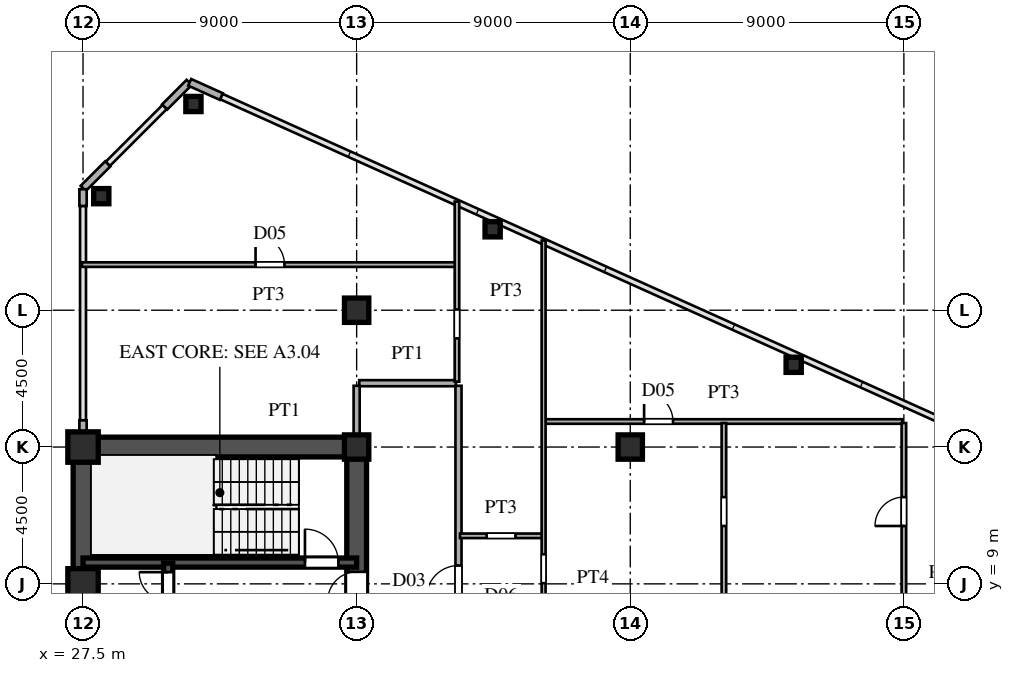
"""IFC4 building model, lengths in metres.
Left out: names, types, materials, properties, quantities, classifications, styles, units other than length and angle.
Written with IfcOpenShell. Run it as: python <this file> out.ifc"""

import sys

from ifc_helpers import new_model, si_unit, direction, frame, frame_2d, origin, origin_2d, place, context, subcontext, project, spatial, rectangle, hollow_rectangle, i_section, extrude, source, transform, mapped, element, fill, save


model = new_model("IFC4")
c1 = context("Model", 3, precision=1e-05, world=origin(), true_north=direction((0.0, 1.0)))
c2 = subcontext(c1, "Body", "Model", "MODEL_VIEW")
j1 = project(units=[si_unit("LENGTHUNIT", "METRE"), si_unit("PLANEANGLEUNIT", "RADIAN")], contexts=[c1])
p1 = place(None, origin())
s1 = spatial("IfcSite", under=j1, at=p1, CompositionType="ELEMENT")
p2 = place(p1, origin())
s2 = spatial("IfcBuilding", under=s1, at=p2, CompositionType="ELEMENT")
p3 = place(p2, frame((0.0, 0.0, 99.6)))
s3 = spatial("IfcBuildingStorey", under=s2, at=p3, CompositionType="ELEMENT", Elevation=99.6)
m1 = source(origin(), c2, "Body", "SweptSolid", [
    extrude(hollow_rectangle(XDim=1.0, YDim=1.0, WallThickness=0.042, at=origin_2d()), origin(), (0.0, 0.0, 1.0), 3.6),
])
for number, where, z_axis, x_axis in (
    (1, (27.5, 9.0, 0.0), (0.0, 0.0, 1.0), (1.0, 0.0, 0.0)),
    (2, (27.5, 13.5, 0.0), (0.0, 0.0, 1.0), (1.0, 0.0, 0.0)),
):
    element("IfcColumn", number, at=place(p3, frame(where, z_axis=z_axis, x_axis=x_axis)), inside=s3, PredefinedType="COLUMN", context=c2, shape_type="MappedRepresentation", body=[
        mapped(m1, transform((0.0, 0.0, 0.0), scale=1.0)),
    ])
m2 = source(origin(), c2, "Body", "SweptSolid", [
    extrude(i_section(OverallWidth=0.8, OverallDepth=0.8, WebThickness=0.032, FlangeThickness=0.05, at=origin_2d()), origin(), (0.0, 0.0, 1.0), 3.6),
])
for number, where, z_axis, x_axis in (
    (3, (36.5, 13.5, 0.0), (0.0, 0.0, 1.0), (1.0, 0.0, 0.0)),
    (4, (36.5, 18.0, 0.0), (0.0, 0.0, 1.0), (1.0, 0.0, 0.0)),
    (5, (45.5, 13.5, 0.0), (0.0, 0.0, 1.0), (1.0, 0.0, 0.0)),
):
    element("IfcColumn", number, at=place(p3, frame(where, z_axis=z_axis, x_axis=x_axis)), inside=s3, PredefinedType="COLUMN", context=c2, shape_type="MappedRepresentation", body=[
        mapped(m2, transform((0.0, 0.0, 0.0), scale=1.0)),
    ])
m3 = source(origin(), c2, "Body", "SweptSolid", [
    extrude(hollow_rectangle(XDim=0.5, YDim=0.5, WallThickness=0.02, at=origin_2d()), origin(), (0.0, 0.0, 1.0), 3.6),
])
for number, where, z_axis, x_axis in (
    (6, (31.131, 24.783, 0.0), (0.0, 0.0, 1.0), (1.0, 0.0, 0.0)),
    (7, (28.1, 21.751, 0.0), (0.0, 0.0, 1.0), (1.0, 0.0, 0.0)),
    (8, (40.973, 20.661, 0.0), (0.0, 0.0, 1.0), (1.0, 0.0, 0.0)),
    (9, (50.875, 16.205, 0.0), (0.0, 0.0, 1.0), (1.0, 0.0, 0.0)),
):
    element("IfcColumn", number, at=place(p3, frame(where, z_axis=z_axis, x_axis=x_axis)), inside=s3, PredefinedType="COLUMN", context=c2, shape_type="MappedRepresentation", body=[
        mapped(m3, transform((0.0, 0.0, 0.0), scale=1.0)),
    ])
p4 = place(p3, frame((32.049, 25.028, 0.0), z_axis=(0.0, 0.0, 1.0), x_axis=(-0.911929519623, 0.410346866979, 0.0)))
e10 = element("IfcWall", 10, at=p4, inside=s3, PredefinedType="SOLIDWALL", context=c2, shape_type="SweptSolid", body=[
    extrude(rectangle(XDim=1.14, YDim=0.24, at=frame_2d((0.57, 0.0))), origin(), (0.0, 0.0, 1.0), 3.38),
])
for number, where, z_axis, x_axis in (
    (11, (30.993, 25.493, 0.0), (0.0, 0.0, 1.0), (-0.707, -0.707, 0.0)),
    (12, (28.313, 22.813, 0.0), (0.0, 0.0, 1.0), (-0.707, -0.707, 0.0)),
):
    element("IfcWall", number, at=place(p3, frame(where, z_axis=z_axis, x_axis=x_axis)), inside=s3, PredefinedType="SOLIDWALL", context=c2, shape_type="SweptSolid", body=[
        extrude(rectangle(XDim=1.14, YDim=0.24, at=frame_2d((0.57, 0.0))), origin(), (0.0, 0.0, 1.0), 3.38),
    ])
p5 = place(p3, frame((27.5, 13.83, 0.0), z_axis=(0.0, 0.0, 1.0), x_axis=(0.0, 1.0, 0.0)))
e13 = element("IfcWall", 13, at=p5, inside=s3, PredefinedType="SOLIDWALL", context=c2, shape_type="SweptSolid", body=[
    extrude(rectangle(XDim=0.55, YDim=0.24, at=frame_2d((0.275, 0.0))), origin(), (0.0, 0.0, 1.0), 2.88),
])
p6 = place(p3, frame((27.5, 21.43, 0.0), z_axis=(0.0, 0.0, 1.0), x_axis=(0.0, 1.0, 0.0)))
e14 = element("IfcWall", 14, at=p6, inside=s3, PredefinedType="SOLIDWALL", context=c2, shape_type="SweptSolid", body=[
    extrude(rectangle(XDim=0.55, YDim=0.24, at=frame_2d((0.275, 0.0))), origin(), (0.0, 0.0, 1.0), 3.38),
])
p7 = place(p3, frame((27.5, 1.3, 0.0), z_axis=(0.0, 0.0, 1.0), x_axis=(0.0, 1.0, 0.0)))
e15 = element("IfcWall", 15, at=p7, inside=s3, PredefinedType="SHEAR", context=c2, shape_type="SweptSolid", body=[
    extrude(rectangle(XDim=12.2, YDim=0.65, at=frame_2d((6.1, 0.0))), origin(), (0.0, 0.0, 1.0), 3.38),
])
p8 = place(p3, frame((27.5, 13.5, 0.0), z_axis=(0.0, 0.0, 1.0), x_axis=(1.0, 0.0, 0.0)))
e16 = element("IfcWall", 16, at=p8, inside=s3, PredefinedType="SHEAR", context=c2, shape_type="SweptSolid", body=[
    extrude(rectangle(XDim=9.0, YDim=0.65, at=frame_2d((4.5, 0.0))), origin(), (0.0, 0.0, 1.0), 3.38),
])
p9 = place(p3, frame((36.5, 8.2, 0.0), z_axis=(0.0, 0.0, 1.0), x_axis=(0.0, 1.0, 0.0)))
e17 = element("IfcWall", 17, at=p9, inside=s3, PredefinedType="SHEAR", context=c2, shape_type="SweptSolid", body=[
    extrude(rectangle(XDim=5.45, YDim=0.65, at=frame_2d((2.725, 0.0))), origin(), (0.0, 0.0, 1.0), 3.38),
])
p10 = place(p9, frame((0.245, 0.0, 0.0)))
e18 = element("IfcOpeningElement", 18, at=p10, cuts=e17, PredefinedType="OPENING", context=c2, shape_type="SweptSolid", body=[
    extrude(rectangle(XDim=0.95, YDim=2.15, at=frame_2d((0.475, 1.075))), frame((0.0, 0.335, 0.0), z_axis=(0.0, -1.0, 0.0), x_axis=(1.0, 0.0, 0.0)), (0.0, 0.0, 1.0), 0.67),
])
p11 = place(p3, frame((27.5, 9.7, 0.0), z_axis=(0.0, 0.0, 1.0), x_axis=(1.0, 0.0, 0.0)))
e19 = element("IfcWall", 19, at=p11, inside=s3, PredefinedType="SHEAR", context=c2, shape_type="SweptSolid", body=[
    extrude(rectangle(XDim=9.0, YDim=0.3, at=frame_2d((4.5, 0.0))), origin(), (0.0, 0.0, 1.0), 3.38),
])
p12 = place(p11, frame((7.3, 0.0, 0.0)))
e20 = element("IfcOpeningElement", 20, at=p12, cuts=e19, PredefinedType="OPENING", context=c2, shape_type="SweptSolid", body=[
    extrude(rectangle(XDim=1.1, YDim=2.2, at=frame_2d((0.55, 1.1))), frame((0.0, 0.16, 0.0), z_axis=(0.0, -1.0, 0.0), x_axis=(1.0, 0.0, 0.0)), (0.0, 0.0, 1.0), 0.32),
])
p13 = place(p3, frame((30.3, 8.15, 0.0), z_axis=(0.0, 0.0, 1.0), x_axis=(0.0, 1.0, 0.0)))
e21 = element("IfcWall", 21, at=p13, inside=s3, PredefinedType="SHEAR", context=c2, shape_type="SweptSolid", body=[
    extrude(rectangle(XDim=1.53, YDim=0.3, at=frame_2d((0.765, 0.0))), origin(), (0.0, 0.0, 1.0), 3.38),
])
p14 = place(p13, frame((0.285, 0.0, 0.0)))
e22 = element("IfcOpeningElement", 22, at=p14, cuts=e21, PredefinedType="OPENING", context=c2, shape_type="SweptSolid", body=[
    extrude(rectangle(XDim=0.95, YDim=2.15, at=frame_2d((0.475, 1.075))), frame((0.0, 0.16, 0.0), z_axis=(0.0, -1.0, 0.0), x_axis=(1.0, 0.0, 0.0)), (0.0, 0.0, 1.0), 0.32),
])
p15 = place(p3, frame((39.9, 10.58, 0.0), z_axis=(0.0, 0.0, 1.0), x_axis=(1.0, 0.0, 0.0)))
e23 = element("IfcWall", 23, at=p15, inside=s3, PredefinedType="PARTITIONING", context=c2, shape_type="SweptSolid", body=[
    extrude(rectangle(XDim=2.7, YDim=0.15, at=frame_2d((1.35, 0.0))), origin(), (0.0, 0.0, 1.0), 3.38),
])
p16 = place(p15, frame((0.875, 0.0, 0.0)))
e24 = element("IfcOpeningElement", 24, at=p16, cuts=e23, PredefinedType="OPENING", context=c2, shape_type="SweptSolid", body=[
    extrude(rectangle(XDim=0.95, YDim=2.15, at=frame_2d((0.475, 1.075))), frame((0.0, 0.085, 0.0), z_axis=(0.0, -1.0, 0.0), x_axis=(1.0, 0.0, 0.0)), (0.0, 0.0, 1.0), 0.17),
])
p17 = place(p3, frame((42.7, 14.34, 0.0), z_axis=(0.0, 0.0, 1.0), x_axis=(1.0, 0.0, 0.0)))
e25 = element("IfcWall", 25, at=p17, inside=s3, PredefinedType="PARTITIONING", context=c2, shape_type="SweptSolid", body=[
    extrude(rectangle(XDim=11.75, YDim=0.15, at=frame_2d((5.875, 0.0))), origin(), (0.0, 0.0, 1.0), 3.38),
])
p18 = place(p17, frame((3.255, 0.0, 0.0)))
e26 = element("IfcOpeningElement", 26, at=p18, cuts=e25, PredefinedType="OPENING", context=c2, shape_type="SweptSolid", body=[
    extrude(rectangle(XDim=0.95, YDim=2.15, at=frame_2d((0.475, 1.075))), frame((0.0, 0.085, 0.0), z_axis=(0.0, -1.0, 0.0), x_axis=(1.0, 0.0, 0.0)), (0.0, 0.0, 1.0), 0.17),
])
p19 = place(p3, frame((36.585, 15.6, 0.0), z_axis=(0.0, 0.0, 1.0), x_axis=(1.0, 0.0, 0.0)))
e27 = element("IfcWall", 27, at=p19, inside=s3, PredefinedType="PARTITIONING", context=c2, shape_type="SweptSolid", body=[
    extrude(rectangle(XDim=3.18, YDim=0.2, at=frame_2d((1.59, 0.0))), origin(), (0.0, 0.0, 1.0), 3.38),
])
p20 = place(p3, frame((27.465, 19.5, 0.0), z_axis=(0.0, 0.0, 1.0), x_axis=(1.0, 0.0, 0.0)))
e28 = element("IfcWall", 28, at=p20, inside=s3, PredefinedType="PARTITIONING", context=c2, shape_type="SweptSolid", body=[
    extrude(rectangle(XDim=12.285, YDim=0.15, at=frame_2d((6.143, 0.0))), origin(), (0.0, 0.0, 1.0), 3.38),
])
p21 = place(p20, frame((5.71, 0.0, 0.0)))
e29 = element("IfcOpeningElement", 29, at=p21, cuts=e28, PredefinedType="OPENING", context=c2, shape_type="SweptSolid", body=[
    extrude(rectangle(XDim=0.95, YDim=2.15, at=frame_2d((0.475, 1.075))), frame((0.0, 0.085, 0.0), z_axis=(0.0, -1.0, 0.0), x_axis=(1.0, 0.0, 0.0)), (0.0, 0.0, 1.0), 0.17),
])
p22 = place(p3, frame((36.5, 13.83, 0.0), z_axis=(0.0, 0.0, 1.0), x_axis=(0.0, 1.0, 0.0)))
e30 = element("IfcWall", 30, at=p22, inside=s3, PredefinedType="PARTITIONING", context=c2, shape_type="SweptSolid", body=[
    extrude(rectangle(XDim=1.685, YDim=0.2, at=frame_2d((0.842, 0.0))), origin(), (0.0, 0.0, 1.0), 2.68),
])
p23 = place(p3, frame((39.8, 15.65, 0.0), z_axis=(0.0, 0.0, 1.0), x_axis=(0.0, 1.0, 0.0)))
e31 = element("IfcWall", 31, at=p23, inside=s3, PredefinedType="PARTITIONING", context=c2, shape_type="SweptSolid", body=[
    extrude(rectangle(XDim=5.925, YDim=0.15, at=frame_2d((2.962, 0.0))), origin(), (0.0, 0.0, 1.0), 3.38),
])
p24 = place(p23, frame((1.425, 0.0, 0.0)))
e32 = element("IfcOpeningElement", 32, at=p24, cuts=e31, PredefinedType="OPENING", context=c2, shape_type="SweptSolid", body=[
    extrude(rectangle(XDim=0.95, YDim=2.15, at=frame_2d((0.475, 1.075))), frame((0.0, 0.085, 0.0), z_axis=(0.0, -1.0, 0.0), x_axis=(1.0, 0.0, 0.0)), (0.0, 0.0, 1.0), 0.17),
])
p25 = place(p3, frame((39.85, -15.515, 0.0), z_axis=(0.0, 0.0, 1.0), x_axis=(0.0, 1.0, 0.0)))
e33 = element("IfcWall", 33, at=p25, inside=s3, PredefinedType="PARTITIONING", context=c2, shape_type="SweptSolid", body=[
    extrude(rectangle(XDim=31.03, YDim=0.2, at=frame_2d((15.515, 0.0))), origin(), (0.0, 0.0, 1.0), 3.38),
])
p26 = place(p25, frame((0.94, 0.0, 0.0)))
e34 = element("IfcOpeningElement", 34, at=p26, cuts=e33, PredefinedType="OPENING", context=c2, shape_type="SweptSolid", body=[
    extrude(rectangle(XDim=1.05, YDim=2.25, at=frame_2d((0.525, 1.125))), frame((0.0, 0.11, 0.0), z_axis=(0.0, -1.0, 0.0), x_axis=(1.0, 0.0, 0.0)), (0.0, 0.0, 1.0), 0.22),
])
p27 = place(p25, frame((9.765, 0.0, 0.0)))
e35 = element("IfcOpeningElement", 35, at=p27, cuts=e33, PredefinedType="OPENING", context=c2, shape_type="SweptSolid", body=[
    extrude(rectangle(XDim=1.05, YDim=2.25, at=frame_2d((0.525, 1.125))), frame((0.0, 0.11, 0.0), z_axis=(0.0, -1.0, 0.0), x_axis=(1.0, 0.0, 0.0)), (0.0, 0.0, 1.0), 0.22),
])
p28 = place(p25, frame((24.067, 0.0, 0.0)))
e36 = element("IfcOpeningElement", 36, at=p28, cuts=e33, PredefinedType="OPENING", context=c2, shape_type="SweptSolid", body=[
    extrude(rectangle(XDim=1.05, YDim=2.25, at=frame_2d((0.525, 1.125))), frame((0.0, 0.11, 0.0), z_axis=(0.0, -1.0, 0.0), x_axis=(1.0, 0.0, 0.0)), (0.0, 0.0, 1.0), 0.22),
])
p29 = place(p3, frame((42.65, -1.948, 0.0), z_axis=(0.0, 0.0, 1.0), x_axis=(0.0, 1.0, 0.0)))
e37 = element("IfcWall", 37, at=p29, inside=s3, PredefinedType="PARTITIONING", context=c2, shape_type="SweptSolid", body=[
    extrude(rectangle(XDim=22.241, YDim=0.13, at=frame_2d((11.121, 0.0))), origin(), (0.0, 0.0, 1.0), 3.38),
])
p30 = place(p29, frame((10.971, 0.0, 0.0)))
e38 = element("IfcOpeningElement", 38, at=p30, cuts=e37, PredefinedType="OPENING", context=c2, shape_type="SweptSolid", body=[
    extrude(rectangle(XDim=0.95, YDim=2.15, at=frame_2d((0.475, 1.075))), frame((0.0, 0.075, 0.0), z_axis=(0.0, -1.0, 0.0), x_axis=(1.0, 0.0, 0.0)), (0.0, 0.0, 1.0), 0.15),
])
p31 = place(p3, frame((48.58, -12.45, 0.0), z_axis=(0.0, 0.0, 1.0), x_axis=(0.0, 1.0, 0.0)))
e39 = element("IfcWall", 39, at=p31, inside=s3, PredefinedType="PARTITIONING", context=c2, shape_type="SweptSolid", body=[
    extrude(rectangle(XDim=26.738, YDim=0.15, at=frame_2d((13.369, 0.0))), origin(), (0.0, 0.0, 1.0), 3.38),
])
p32 = place(p31, frame((6.975, 0.0, 0.0)))
e40 = element("IfcOpeningElement", 40, at=p32, cuts=e39, PredefinedType="OPENING", context=c2, shape_type="SweptSolid", body=[
    extrude(rectangle(XDim=0.95, YDim=2.15, at=frame_2d((0.475, 1.075))), frame((0.0, 0.085, 0.0), z_axis=(0.0, -1.0, 0.0), x_axis=(1.0, 0.0, 0.0)), (0.0, 0.0, 1.0), 0.17),
])
p33 = place(p31, frame((1.975, 0.0, 0.0)))
e41 = element("IfcOpeningElement", 41, at=p33, cuts=e39, PredefinedType="OPENING", context=c2, shape_type="SweptSolid", body=[
    extrude(rectangle(XDim=0.95, YDim=2.15, at=frame_2d((0.475, 1.075))), frame((0.0, 0.085, 0.0), z_axis=(0.0, -1.0, 0.0), x_axis=(1.0, 0.0, 0.0)), (0.0, 0.0, 1.0), 0.17),
])
p34 = place(p31, frame((23.354, 0.0, 0.0)))
e42 = element("IfcOpeningElement", 42, at=p34, cuts=e39, PredefinedType="OPENING", context=c2, shape_type="SweptSolid", body=[
    extrude(rectangle(XDim=0.95, YDim=2.15, at=frame_2d((0.475, 1.075))), frame((0.0, 0.085, 0.0), z_axis=(0.0, -1.0, 0.0), x_axis=(1.0, 0.0, 0.0)), (0.0, 0.0, 1.0), 0.17),
])
p35 = place(p31, frame((17.435, 0.0, 0.0)))
e43 = element("IfcOpeningElement", 43, at=p35, cuts=e39, PredefinedType="OPENING", context=c2, shape_type="SweptSolid", body=[
    extrude(rectangle(XDim=0.95, YDim=2.15, at=frame_2d((0.475, 1.075))), frame((0.0, 0.085, 0.0), z_axis=(0.0, -1.0, 0.0), x_axis=(1.0, 0.0, 0.0)), (0.0, 0.0, 1.0), 0.17),
])
p36 = place(p3, frame((54.5, -12.45, 0.0), z_axis=(0.0, 0.0, 1.0), x_axis=(0.0, 1.0, 0.0)))
e44 = element("IfcWall", 44, at=p36, inside=s3, PredefinedType="PARTITIONING", context=c2, shape_type="SweptSolid", body=[
    extrude(rectangle(XDim=26.738, YDim=0.15, at=frame_2d((13.369, 0.0))), origin(), (0.0, 0.0, 1.0), 2.68),
])
p37 = place(p36, frame((6.458, 0.0, 0.0)))
e45 = element("IfcOpeningElement", 45, at=p37, cuts=e44, PredefinedType="OPENING", context=c2, shape_type="SweptSolid", body=[
    extrude(rectangle(XDim=0.95, YDim=2.15, at=frame_2d((0.475, 1.075))), frame((0.0, 0.085, 0.0), z_axis=(0.0, -1.0, 0.0), x_axis=(1.0, 0.0, 0.0)), (0.0, 0.0, 1.0), 0.17),
])
p38 = place(p36, frame((11.975, 0.0, 0.0)))
e46 = element("IfcOpeningElement", 46, at=p38, cuts=e44, PredefinedType="OPENING", context=c2, shape_type="SweptSolid", body=[
    extrude(rectangle(XDim=0.95, YDim=2.15, at=frame_2d((0.475, 1.075))), frame((0.0, 0.085, 0.0), z_axis=(0.0, -1.0, 0.0), x_axis=(1.0, 0.0, 0.0)), (0.0, 0.0, 1.0), 0.17),
])
p39 = place(p36, frame((23.354, 0.0, 0.0)))
e47 = element("IfcOpeningElement", 47, at=p39, cuts=e44, PredefinedType="OPENING", context=c2, shape_type="SweptSolid", body=[
    extrude(rectangle(XDim=0.95, YDim=2.15, at=frame_2d((0.475, 1.075))), frame((0.0, 0.085, 0.0), z_axis=(0.0, -1.0, 0.0), x_axis=(1.0, 0.0, 0.0)), (0.0, 0.0, 1.0), 0.17),
])
p40 = place(p36, frame((17.435, 0.0, 0.0)))
e48 = element("IfcOpeningElement", 48, at=p40, cuts=e44, PredefinedType="OPENING", context=c2, shape_type="SweptSolid", body=[
    extrude(rectangle(XDim=0.95, YDim=2.15, at=frame_2d((0.475, 1.075))), frame((0.0, 0.085, 0.0), z_axis=(0.0, -1.0, 0.0), x_axis=(1.0, 0.0, 0.0)), (0.0, 0.0, 1.0), 0.17),
])
m4 = source(origin(), c2, "Body", "SweptSolid", [
    extrude(rectangle(XDim=0.95, YDim=2.15, at=frame_2d((0.475, 1.075))), frame((0.0, 0.025, 0.0), z_axis=(0.0, -1.0, 0.0), x_axis=(1.0, 0.0, 0.0)), (0.0, 0.0, 1.0), 0.05),
])
p41 = place(p10, origin())
e49 = element("IfcDoor", 49, at=p41, inside=s3, OperationType="SINGLE_SWING_LEFT", PredefinedType="DOOR", context=c2, shape_type="MappedRepresentation", body=[
    mapped(m4, transform((0.0, 0.0, 0.0), scale=1.0)),
])
fill(e18, e49)
m5 = source(origin(), c2, "Body", "SweptSolid", [
    extrude(rectangle(XDim=1.1, YDim=2.2, at=frame_2d((0.55, 1.1))), frame((0.0, 0.025, 0.0), z_axis=(0.0, -1.0, 0.0), x_axis=(1.0, 0.0, 0.0)), (0.0, 0.0, 1.0), 0.05),
])
p42 = place(p12, origin())
e50 = element("IfcDoor", 50, at=p42, inside=s3, OperationType="SINGLE_SWING_LEFT", PredefinedType="DOOR", context=c2, shape_type="MappedRepresentation", body=[
    mapped(m5, transform((0.0, 0.0, 0.0), scale=1.0)),
])
fill(e20, e50)
p43 = place(p14, origin())
e51 = element("IfcDoor", 51, at=p43, inside=s3, OperationType="SINGLE_SWING_RIGHT", PredefinedType="DOOR", context=c2, shape_type="MappedRepresentation", body=[
    mapped(m4, transform((0.0, 0.0, 0.0), scale=1.0)),
])
fill(e22, e51)
m6 = source(origin(), c2, "Body", "SweptSolid", [
    extrude(rectangle(XDim=0.95, YDim=2.15, at=frame_2d((0.475, 1.075))), frame((0.0, 0.025, 0.0), z_axis=(0.0, -1.0, 0.0), x_axis=(1.0, 0.0, 0.0)), (0.0, 0.0, 1.0), 0.05),
])
p44 = place(p18, origin())
e52 = element("IfcDoor", 52, at=p44, inside=s3, OperationType="SINGLE_SWING_LEFT", PredefinedType="DOOR", context=c2, shape_type="MappedRepresentation", body=[
    mapped(m6, transform((0.0, 0.0, 0.0), scale=1.0)),
])
fill(e26, e52)
p45 = place(p21, origin())
e53 = element("IfcDoor", 53, at=p45, inside=s3, OperationType="SINGLE_SWING_LEFT", PredefinedType="DOOR", context=c2, shape_type="MappedRepresentation", body=[
    mapped(m6, transform((0.0, 0.0, 0.0), scale=1.0)),
])
fill(e29, e53)
m7 = source(origin(), c2, "Body", "SweptSolid", [
    extrude(rectangle(XDim=1.05, YDim=2.25, at=frame_2d((0.525, 1.125))), frame((0.0, 0.025, 0.0), z_axis=(0.0, -1.0, 0.0), x_axis=(1.0, 0.0, 0.0)), (0.0, 0.0, 1.0), 0.05),
])
p46 = place(p28, origin())
e54 = element("IfcDoor", 54, at=p46, inside=s3, OperationType="SINGLE_SWING_LEFT", PredefinedType="DOOR", context=c2, shape_type="MappedRepresentation", body=[
    mapped(m7, transform((0.0, 0.0, 0.0), scale=1.0)),
])
fill(e36, e54)
p47 = place(p39, origin())
e55 = element("IfcDoor", 55, at=p47, inside=s3, OperationType="SINGLE_SWING_LEFT", PredefinedType="DOOR", context=c2, shape_type="MappedRepresentation", body=[
    mapped(m6, transform((0.0, 0.0, 0.0), scale=1.0)),
])
fill(e47, e55)
save(model, sys.argv[1])
